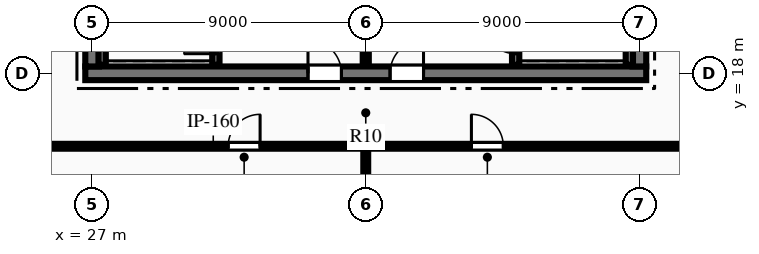
"""IFC4 building model, lengths in metres.
Left out: names, types, materials, properties, quantities, classifications, styles, units other than length and angle.
Written with IfcOpenShell. Run it as: python <this file> out.ifc"""

import sys

from ifc_helpers import new_model, si_unit, direction, frame, frame_2d, origin, place, context, subcontext, project, spatial, rectangle, extrude, element, fill, save


model = new_model("IFC4")
c1 = context("Model", 3, precision=1e-05, world=origin(), true_north=direction((0.0, 1.0)))
c2 = subcontext(c1, "Body", "Model", "MODEL_VIEW")
j1 = project(units=[si_unit("LENGTHUNIT", "METRE"), si_unit("PLANEANGLEUNIT", "RADIAN")], contexts=[c1])
p1 = place(None, origin())
s1 = spatial("IfcSite", under=j1, at=p1, CompositionType="ELEMENT")
p2 = place(p1, origin())
s2 = spatial("IfcBuilding", under=s1, at=p2, CompositionType="ELEMENT")
p3 = place(p2, frame((0.0, 0.0, 360.6)))
s3 = spatial("IfcBuildingStorey", under=s2, at=p3, CompositionType="ELEMENT", Elevation=360.6)
p4 = place(p3, frame((26.775, 18.0, 0.0), z_axis=(0.0, 0.0, 1.0), x_axis=(1.0, 0.0, 0.0)))
e1 = element("IfcWall", 1, at=p4, inside=s3, PredefinedType="SHEAR", context=c2, shape_type="SweptSolid", body=[
    extrude(rectangle(XDim=18.45, YDim=0.45, at=frame_2d((9.225, 0.0))), origin(), (0.0, 0.0, 1.0), 3.6),
])
p5 = place(p4, frame((7.325, 0.0, 0.0)))
e2 = element("IfcOpeningElement", 2, at=p5, cuts=e1, PredefinedType="OPENING", context=c2, shape_type="SweptSolid", body=[
    extrude(rectangle(XDim=1.1, YDim=2.15, at=frame_2d((0.55, 1.075))), frame((0.0, 0.235, 0.0), z_axis=(0.0, -1.0, 0.0), x_axis=(1.0, 0.0, 0.0)), (0.0, 0.0, 1.0), 0.47),
])
p6 = place(p4, frame((10.025, 0.0, 0.0)))
e3 = element("IfcOpeningElement", 3, at=p6, cuts=e1, PredefinedType="OPENING", context=c2, shape_type="SweptSolid", body=[
    extrude(rectangle(XDim=1.1, YDim=2.15, at=frame_2d((0.55, 1.075))), frame((0.0, 0.235, 0.0), z_axis=(0.0, -1.0, 0.0), x_axis=(1.0, 0.0, 0.0)), (0.0, 0.0, 1.0), 0.47),
])
p7 = place(p3, frame((27.0, 18.225, 0.0), z_axis=(0.0, 0.0, 1.0), x_axis=(0.0, 1.0, 0.0)))
e4 = element("IfcWall", 4, at=p7, inside=s3, PredefinedType="SHEAR", context=c2, shape_type="SweptSolid", body=[
    extrude(rectangle(XDim=15.55, YDim=0.45, at=frame_2d((7.775, 0.0))), origin(), (0.0, 0.0, 1.0), 3.6),
])
p8 = place(p7, frame((10.015, 0.0, 0.0)))
e5 = element("IfcOpeningElement", 5, at=p8, cuts=e4, PredefinedType="OPENING", context=c2, shape_type="SweptSolid", body=[
    extrude(rectangle(XDim=1.4, YDim=2.2, at=frame_2d((0.7, 1.1))), frame((0.0, 0.235, 0.0), z_axis=(0.0, -1.0, 0.0), x_axis=(1.0, 0.0, 0.0)), (0.0, 0.0, 1.0), 0.47),
])
p9 = place(p3, frame((45.0, 18.225, 0.0), z_axis=(0.0, 0.0, 1.0), x_axis=(0.0, 1.0, 0.0)))
e6 = element("IfcWall", 6, at=p9, inside=s3, PredefinedType="SHEAR", context=c2, shape_type="SweptSolid", body=[
    extrude(rectangle(XDim=15.55, YDim=0.45, at=frame_2d((7.775, 0.0))), origin(), (0.0, 0.0, 1.0), 3.6),
])
p10 = place(p9, frame((10.015, 0.0, 0.0)))
e7 = element("IfcOpeningElement", 7, at=p10, cuts=e6, PredefinedType="OPENING", context=c2, shape_type="SweptSolid", body=[
    extrude(rectangle(XDim=1.4, YDim=2.2, at=frame_2d((0.7, 1.1))), frame((0.0, 0.235, 0.0), z_axis=(0.0, -1.0, 0.0), x_axis=(1.0, 0.0, 0.0)), (0.0, 0.0, 1.0), 0.47),
])
p11 = place(p3, frame((31.07, 18.28, 0.0), z_axis=(0.0, 0.0, 1.0), x_axis=(0.0, 1.0, 0.0)))
e8 = element("IfcWall", 8, at=p11, inside=s3, PredefinedType="SHEAR", context=c2, shape_type="SweptSolid", body=[
    extrude(rectangle(XDim=8.26, YDim=0.24, at=frame_2d((4.13, 0.0))), origin(), (0.0, 0.0, 1.0), 3.6),
])
p12 = place(p11, frame((0.365, 0.0, 0.0)))
e9 = element("IfcOpeningElement", 9, at=p12, cuts=e8, PredefinedType="OPENING", context=c2, shape_type="SweptSolid", body=[
    extrude(rectangle(XDim=1.05, YDim=2.15, at=frame_2d((0.525, 1.075))), frame((0.0, 0.13, 0.0), z_axis=(0.0, -1.0, 0.0), x_axis=(1.0, 0.0, 0.0)), (0.0, 0.0, 1.0), 0.26),
])
p13 = place(p3, frame((27.33, 18.28, 0.0), z_axis=(0.0, 0.0, 1.0), x_axis=(0.0, 1.0, 0.0)))
e10 = element("IfcWall", 10, at=p13, inside=s3, PredefinedType="SHEAR", context=c2, shape_type="SweptSolid", body=[
    extrude(rectangle(XDim=8.26, YDim=0.24, at=frame_2d((4.13, 0.0))), origin(), (0.0, 0.0, 1.0), 3.6),
])
p14 = place(p3, frame((40.93, 18.28, 0.0), z_axis=(0.0, 0.0, 1.0), x_axis=(0.0, 1.0, 0.0)))
e11 = element("IfcWall", 11, at=p14, inside=s3, PredefinedType="SHEAR", context=c2, shape_type="SweptSolid", body=[
    extrude(rectangle(XDim=8.26, YDim=0.24, at=frame_2d((4.13, 0.0))), origin(), (0.0, 0.0, 1.0), 3.6),
])
p15 = place(p14, frame((0.365, 0.0, 0.0)))
e12 = element("IfcOpeningElement", 12, at=p15, cuts=e11, PredefinedType="OPENING", context=c2, shape_type="SweptSolid", body=[
    extrude(rectangle(XDim=1.05, YDim=2.15, at=frame_2d((0.525, 1.075))), frame((0.0, 0.13, 0.0), z_axis=(0.0, -1.0, 0.0), x_axis=(1.0, 0.0, 0.0)), (0.0, 0.0, 1.0), 0.26),
])
p16 = place(p3, frame((44.67, 18.28, 0.0), z_axis=(0.0, 0.0, 1.0), x_axis=(0.0, 1.0, 0.0)))
e13 = element("IfcWall", 13, at=p16, inside=s3, PredefinedType="SHEAR", context=c2, shape_type="SweptSolid", body=[
    extrude(rectangle(XDim=8.26, YDim=0.24, at=frame_2d((4.13, 0.0))), origin(), (0.0, 0.0, 1.0), 3.6),
])
p17 = place(p3, frame((36.0, 18.28, 0.0), z_axis=(0.0, 0.0, 1.0), x_axis=(0.0, 1.0, 0.0)))
e14 = element("IfcWall", 14, at=p17, inside=s3, PredefinedType="PARTITIONING", context=c2, shape_type="SweptSolid", body=[
    extrude(rectangle(XDim=3.77, YDim=0.2, at=frame_2d((1.885, 0.0))), origin(), (0.0, 0.0, 1.0), 3.33),
])
p18 = place(p3, frame((24.6, 15.6, 0.0), z_axis=(0.0, 0.0, 1.0), x_axis=(1.0, 0.0, 0.0)))
e15 = element("IfcWall", 15, at=p18, inside=s3, PredefinedType="PARTITIONING", context=c2, shape_type="SweptSolid", body=[
    extrude(rectangle(XDim=22.8, YDim=0.16, at=frame_2d((11.4, 0.0))), origin(), (0.0, 0.0, 1.0), 3.33),
])
p19 = place(p18, frame((6.875, 0.0, 0.0)))
e16 = element("IfcOpeningElement", 16, at=p19, cuts=e15, PredefinedType="OPENING", context=c2, shape_type="SweptSolid", body=[
    extrude(rectangle(XDim=1.05, YDim=2.15, at=frame_2d((0.525, 1.075))), frame((0.0, 0.09, 0.0), z_axis=(0.0, -1.0, 0.0), x_axis=(1.0, 0.0, 0.0)), (0.0, 0.0, 1.0), 0.18),
])
p20 = place(p18, frame((14.875, 0.0, 0.0)))
e17 = element("IfcOpeningElement", 17, at=p20, cuts=e15, PredefinedType="OPENING", context=c2, shape_type="SweptSolid", body=[
    extrude(rectangle(XDim=1.05, YDim=2.15, at=frame_2d((0.525, 1.075))), frame((0.0, 0.09, 0.0), z_axis=(0.0, -1.0, 0.0), x_axis=(1.0, 0.0, 0.0)), (0.0, 0.0, 1.0), 0.18),
])
p21 = place(p3, frame((36.0, 4.38, 0.0), z_axis=(0.0, 0.0, 1.0), x_axis=(0.0, 1.0, 0.0)))
e18 = element("IfcWall", 18, at=p21, inside=s3, PredefinedType="PARTITIONING", context=c2, shape_type="SweptSolid", body=[
    extrude(rectangle(XDim=11.22, YDim=0.16, at=frame_2d((5.61, 0.0))), origin(), (0.0, 0.0, 1.0), 3.33),
])
p22 = place(p12, origin())
e19 = element("IfcDoor", 19, at=p22, inside=s3, OperationType="SINGLE_SWING_LEFT", PredefinedType="DOOR", context=c2, shape_type="SweptSolid", body=[
    extrude(rectangle(XDim=1.05, YDim=2.15, at=frame_2d((0.525, 1.075))), frame((0.0, 0.025, 0.0), z_axis=(0.0, -1.0, 0.0), x_axis=(1.0, 0.0, 0.0)), (0.0, 0.0, 1.0), 0.05),
])
fill(e9, e19)
p23 = place(p15, origin())
e20 = element("IfcDoor", 20, at=p23, inside=s3, OperationType="SINGLE_SWING_RIGHT", PredefinedType="DOOR", context=c2, shape_type="SweptSolid", body=[
    extrude(rectangle(XDim=1.05, YDim=2.15, at=frame_2d((0.525, 1.075))), frame((0.0, 0.025, 0.0), z_axis=(0.0, -1.0, 0.0), x_axis=(1.0, 0.0, 0.0)), (0.0, 0.0, 1.0), 0.05),
])
fill(e12, e20)
p24 = place(p5, origin())
e21 = element("IfcDoor", 21, at=p24, inside=s3, OperationType="SINGLE_SWING_LEFT", PredefinedType="DOOR", context=c2, shape_type="SweptSolid", body=[
    extrude(rectangle(XDim=1.1, YDim=2.15, at=frame_2d((0.55, 1.075))), frame((0.0, 0.025, 0.0), z_axis=(0.0, -1.0, 0.0), x_axis=(1.0, 0.0, 0.0)), (0.0, 0.0, 1.0), 0.05),
])
fill(e2, e21)
p25 = place(p6, origin())
e22 = element("IfcDoor", 22, at=p25, inside=s3, OperationType="SINGLE_SWING_RIGHT", PredefinedType="DOOR", context=c2, shape_type="SweptSolid", body=[
    extrude(rectangle(XDim=1.1, YDim=2.15, at=frame_2d((0.55, 1.075))), frame((0.0, 0.025, 0.0), z_axis=(0.0, -1.0, 0.0), x_axis=(1.0, 0.0, 0.0)), (0.0, 0.0, 1.0), 0.05),
])
fill(e3, e22)
p26 = place(p19, origin())
e23 = element("IfcDoor", 23, at=p26, inside=s3, OperationType="SINGLE_SWING_RIGHT", PredefinedType="DOOR", context=c2, shape_type="SweptSolid", body=[
    extrude(rectangle(XDim=1.05, YDim=2.15, at=frame_2d((0.525, 1.075))), frame((0.0, 0.025, 0.0), z_axis=(0.0, -1.0, 0.0), x_axis=(1.0, 0.0, 0.0)), (0.0, 0.0, 1.0), 0.05),
])
fill(e16, e23)
p27 = place(p20, origin())
e24 = element("IfcDoor", 24, at=p27, inside=s3, OperationType="SINGLE_SWING_LEFT", PredefinedType="DOOR", context=c2, shape_type="SweptSolid", body=[
    extrude(rectangle(XDim=1.05, YDim=2.15, at=frame_2d((0.525, 1.075))), frame((0.0, 0.025, 0.0), z_axis=(0.0, -1.0, 0.0), x_axis=(1.0, 0.0, 0.0)), (0.0, 0.0, 1.0), 0.05),
])
fill(e17, e24)
save(model, sys.argv[1])
